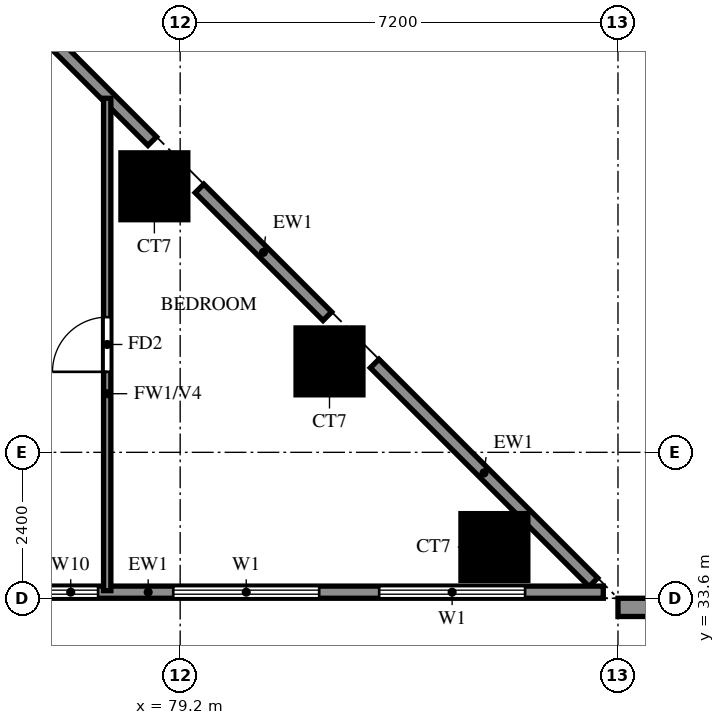
"""IFC4 building model, lengths in metres.
Left out: names, types, materials, properties, quantities, classifications, styles, units other than length and angle.
Written with IfcOpenShell. Run it as: python <this file> out.ifc"""

import sys

from ifc_helpers import new_model, si_unit, direction, frame, frame_2d, origin, origin_2d, place, context, subcontext, project, spatial, rectangle, extrude, source, transform, mapped, element, fill, save


model = new_model("IFC4")
c1 = context("Model", 3, precision=1e-05, world=origin(), true_north=direction((0.0, 1.0)))
c2 = subcontext(c1, "Body", "Model", "MODEL_VIEW")
j1 = project(units=[si_unit("LENGTHUNIT", "METRE"), si_unit("PLANEANGLEUNIT", "RADIAN")], contexts=[c1])
p1 = place(None, origin())
s1 = spatial("IfcSite", under=j1, at=p1, CompositionType="ELEMENT")
p2 = place(p1, origin())
s2 = spatial("IfcBuilding", under=s1, at=p2, CompositionType="ELEMENT")
p3 = place(p2, frame((0.0, 0.0, 51.5)))
s3 = spatial("IfcBuildingStorey", under=s2, at=p3, CompositionType="ELEMENT", Elevation=51.5)
m1 = source(origin(), c2, "Body", "SweptSolid", [
    extrude(rectangle(XDim=1.1, YDim=1.1, at=origin_2d()), origin(), (0.0, 0.0, 1.0), 3.18),
])
for number, where, z_axis, x_axis in (
    (1, (84.367, 34.442, 0.0), (0.0, 0.0, 1.0), (1.0, 0.0, 0.0)),
    (2, (81.656, 37.496, 0.0), (0.0, 0.0, 1.0), (1.0, 0.0, 0.0)),
    (3, (78.776, 40.376, 0.0), (0.0, 0.0, 1.0), (1.0, 0.0, 0.0)),
):
    element("IfcColumn", number, at=place(p3, frame(where, z_axis=z_axis, x_axis=x_axis)), inside=s3, PredefinedType="COLUMN", context=c2, shape_type="MappedRepresentation", body=[
        mapped(m1, transform((0.0, 0.0, 0.0))),
    ])
p4 = place(p3, frame((85.996, 33.863, 0.0), z_axis=(0.0, 0.0, 1.0), x_axis=(-0.7070827891, 0.707130772459, 0.0)))
e4 = element("IfcWall", 4, at=p4, inside=s3, PredefinedType="SOLIDWALL", context=c2, shape_type="SweptSolid", body=[
    extrude(rectangle(XDim=5.088, YDim=0.2, at=frame_2d((2.544, 0.0))), origin(), (0.0, 0.0, 1.0), 3.18),
])
p5 = place(p3, frame((81.62, 38.238, 0.0), z_axis=(0.0, 0.0, 1.0), x_axis=(-0.707106781187, 0.707106781187, 0.0)))
e5 = element("IfcWall", 5, at=p5, inside=s3, PredefinedType="SOLIDWALL", context=c2, shape_type="SweptSolid", body=[
    extrude(rectangle(XDim=2.973, YDim=0.2, at=frame_2d((1.486, 0.0))), origin(), (0.0, 0.0, 1.0), 3.18),
])
p6 = place(p3, frame((78.74, 41.118, 0.0), z_axis=(0.0, 0.0, 1.0), x_axis=(-0.707106781187, 0.707106781187, 0.0)))
e6 = element("IfcWall", 6, at=p6, inside=s3, PredefinedType="SOLIDWALL", context=c2, shape_type="SweptSolid", body=[
    extrude(rectangle(XDim=9.874, YDim=0.2, at=frame_2d((4.937, 0.0))), origin(), (0.0, 0.0, 1.0), 3.18),
])
p7 = place(p6, frame((2.264, 0.0, 0.6)))
e7 = element("IfcOpeningElement", 7, at=p7, cuts=e6, PredefinedType="OPENING", context=c2, shape_type="SweptSolid", body=[
    extrude(rectangle(XDim=2.4, YDim=2.4, at=frame_2d((1.2, 1.2))), frame((0.0, 0.11, 0.0), z_axis=(0.0, -1.0, 0.0), x_axis=(1.0, 0.0, 0.0)), (0.0, 0.0, 1.0), 0.22),
])
p8 = place(p6, frame((5.836, 0.0, 0.6)))
e8 = element("IfcOpeningElement", 8, at=p8, cuts=e6, PredefinedType="OPENING", context=c2, shape_type="SweptSolid", body=[
    extrude(rectangle(XDim=2.4, YDim=2.4, at=frame_2d((1.2, 1.2))), frame((0.0, 0.11, 0.0), z_axis=(0.0, -1.0, 0.0), x_axis=(1.0, 0.0, 0.0)), (0.0, 0.0, 1.0), 0.22),
])
p9 = place(p3, frame((72.55, 33.7, 0.0), z_axis=(0.0, 0.0, 1.0), x_axis=(1.0, 0.0, 0.0)))
e9 = element("IfcWall", 9, at=p9, inside=s3, PredefinedType="SOLIDWALL", context=c2, shape_type="SweptSolid", body=[
    extrude(rectangle(XDim=13.609, YDim=0.2, at=frame_2d((6.804, 0.0))), origin(), (0.0, 0.0, 1.0), 3.18),
])
p10 = place(p9, frame((0.35, 0.0, 0.0)))
e10 = element("IfcOpeningElement", 10, at=p10, cuts=e9, PredefinedType="OPENING", context=c2, shape_type="SweptSolid", body=[
    extrude(rectangle(XDim=1.8, YDim=2.4, at=frame_2d((0.9, 1.2))), frame((0.0, 0.11, 0.0), z_axis=(0.0, -1.0, 0.0), x_axis=(1.0, 0.0, 0.0)), (0.0, 0.0, 1.0), 0.22),
])
p11 = place(p9, frame((2.6, 0.0, 0.6)))
e11 = element("IfcOpeningElement", 11, at=p11, cuts=e9, PredefinedType="OPENING", context=c2, shape_type="SweptSolid", body=[
    extrude(rectangle(XDim=0.9, YDim=2.4, at=frame_2d((0.45, 1.2))), frame((0.0, 0.11, 0.0), z_axis=(0.0, -1.0, 0.0), x_axis=(1.0, 0.0, 0.0)), (0.0, 0.0, 1.0), 0.22),
])
p12 = place(p9, frame((4.4, 0.0, 0.6)))
e12 = element("IfcOpeningElement", 12, at=p12, cuts=e9, PredefinedType="OPENING", context=c2, shape_type="SweptSolid", body=[
    extrude(rectangle(XDim=0.9, YDim=2.4, at=frame_2d((0.45, 1.2))), frame((0.0, 0.11, 0.0), z_axis=(0.0, -1.0, 0.0), x_axis=(1.0, 0.0, 0.0)), (0.0, 0.0, 1.0), 0.22),
])
p13 = place(p9, frame((6.536, 0.0, 0.6)))
e13 = element("IfcOpeningElement", 13, at=p13, cuts=e9, PredefinedType="OPENING", context=c2, shape_type="SweptSolid", body=[
    extrude(rectangle(XDim=2.4, YDim=2.4, at=frame_2d((1.2, 1.2))), frame((0.0, 0.11, 0.0), z_axis=(0.0, -1.0, 0.0), x_axis=(1.0, 0.0, 0.0)), (0.0, 0.0, 1.0), 0.22),
])
p14 = place(p9, frame((9.922, 0.0, 0.6)))
e14 = element("IfcOpeningElement", 14, at=p14, cuts=e9, PredefinedType="OPENING", context=c2, shape_type="SweptSolid", body=[
    extrude(rectangle(XDim=2.4, YDim=2.4, at=frame_2d((1.2, 1.2))), frame((0.0, 0.11, 0.0), z_axis=(0.0, -1.0, 0.0), x_axis=(1.0, 0.0, 0.0)), (0.0, 0.0, 1.0), 0.22),
])
p15 = place(p3, frame((86.4, 33.45, -0.32), z_axis=(0.0, 0.0, 1.0), x_axis=(1.0, 0.0, 0.0)))
e15 = element("IfcWall", 15, at=p15, inside=s3, PredefinedType="SOLIDWALL", context=c2, shape_type="SweptSolid", body=[
    extrude(rectangle(XDim=2.4, YDim=0.3, at=frame_2d((1.2, 0.0))), origin(), (0.0, 0.0, 1.0), 3.5),
])
p16 = place(p3, frame((78.0, 33.725, 0.0), z_axis=(0.0, 0.0, 1.0), x_axis=(0.0, 1.0, 0.0)))
e16 = element("IfcWall", 16, at=p16, inside=s3, PredefinedType="PARTITIONING", context=c2, shape_type="SweptSolid", body=[
    extrude(rectangle(XDim=8.098, YDim=0.12, at=frame_2d((4.049, 0.0))), origin(), (0.0, 0.0, 1.0), 2.28),
])
p17 = place(p16, frame((3.599, 0.0, 0.0)))
e17 = element("IfcOpeningElement", 17, at=p17, cuts=e16, PredefinedType="OPENING", context=c2, shape_type="SweptSolid", body=[
    extrude(rectangle(XDim=0.9, YDim=2.1, at=frame_2d((0.45, 1.05))), frame((0.0, 0.07, 0.0), z_axis=(0.0, -1.0, 0.0), x_axis=(1.0, 0.0, 0.0)), (0.0, 0.0, 1.0), 0.14),
])
p18 = place(p12, origin())
e18 = element("IfcWindow", 18, at=p18, inside=s3, PartitioningType="SINGLE_PANEL", PredefinedType="WINDOW", context=c2, shape_type="SweptSolid", body=[
    extrude(rectangle(XDim=0.9, YDim=2.4, at=frame_2d((0.45, 1.2))), frame((0.0, 0.03, 0.0), z_axis=(0.0, -1.0, 0.0), x_axis=(1.0, 0.0, 0.0)), (0.0, 0.0, 1.0), 0.06),
])
fill(e12, e18)
p19 = place(p13, origin())
e19 = element("IfcWindow", 19, at=p19, inside=s3, PartitioningType="DOUBLE_PANEL_VERTICAL", PredefinedType="WINDOW", context=c2, shape_type="SweptSolid", body=[
    extrude(rectangle(XDim=2.4, YDim=2.4, at=frame_2d((1.2, 1.2))), frame((0.0, 0.03, 0.0), z_axis=(0.0, -1.0, 0.0), x_axis=(1.0, 0.0, 0.0)), (0.0, 0.0, 1.0), 0.06),
])
fill(e13, e19)
p20 = place(p14, origin())
e20 = element("IfcWindow", 20, at=p20, inside=s3, PartitioningType="DOUBLE_PANEL_VERTICAL", PredefinedType="WINDOW", context=c2, shape_type="SweptSolid", body=[
    extrude(rectangle(XDim=2.4, YDim=2.4, at=frame_2d((1.2, 1.2))), frame((0.0, 0.03, 0.0), z_axis=(0.0, -1.0, 0.0), x_axis=(1.0, 0.0, 0.0)), (0.0, 0.0, 1.0), 0.06),
])
fill(e14, e20)
p21 = place(p17, origin())
e21 = element("IfcDoor", 21, at=p21, inside=s3, OperationType="SINGLE_SWING_RIGHT", PredefinedType="DOOR", context=c2, shape_type="SweptSolid", body=[
    extrude(rectangle(XDim=0.9, YDim=2.1, at=frame_2d((0.45, 1.05))), frame((0.0, 0.025, 0.0), z_axis=(0.0, -1.0, 0.0), x_axis=(1.0, 0.0, 0.0)), (0.0, 0.0, 1.0), 0.05),
])
fill(e17, e21)
save(model, sys.argv[1])
